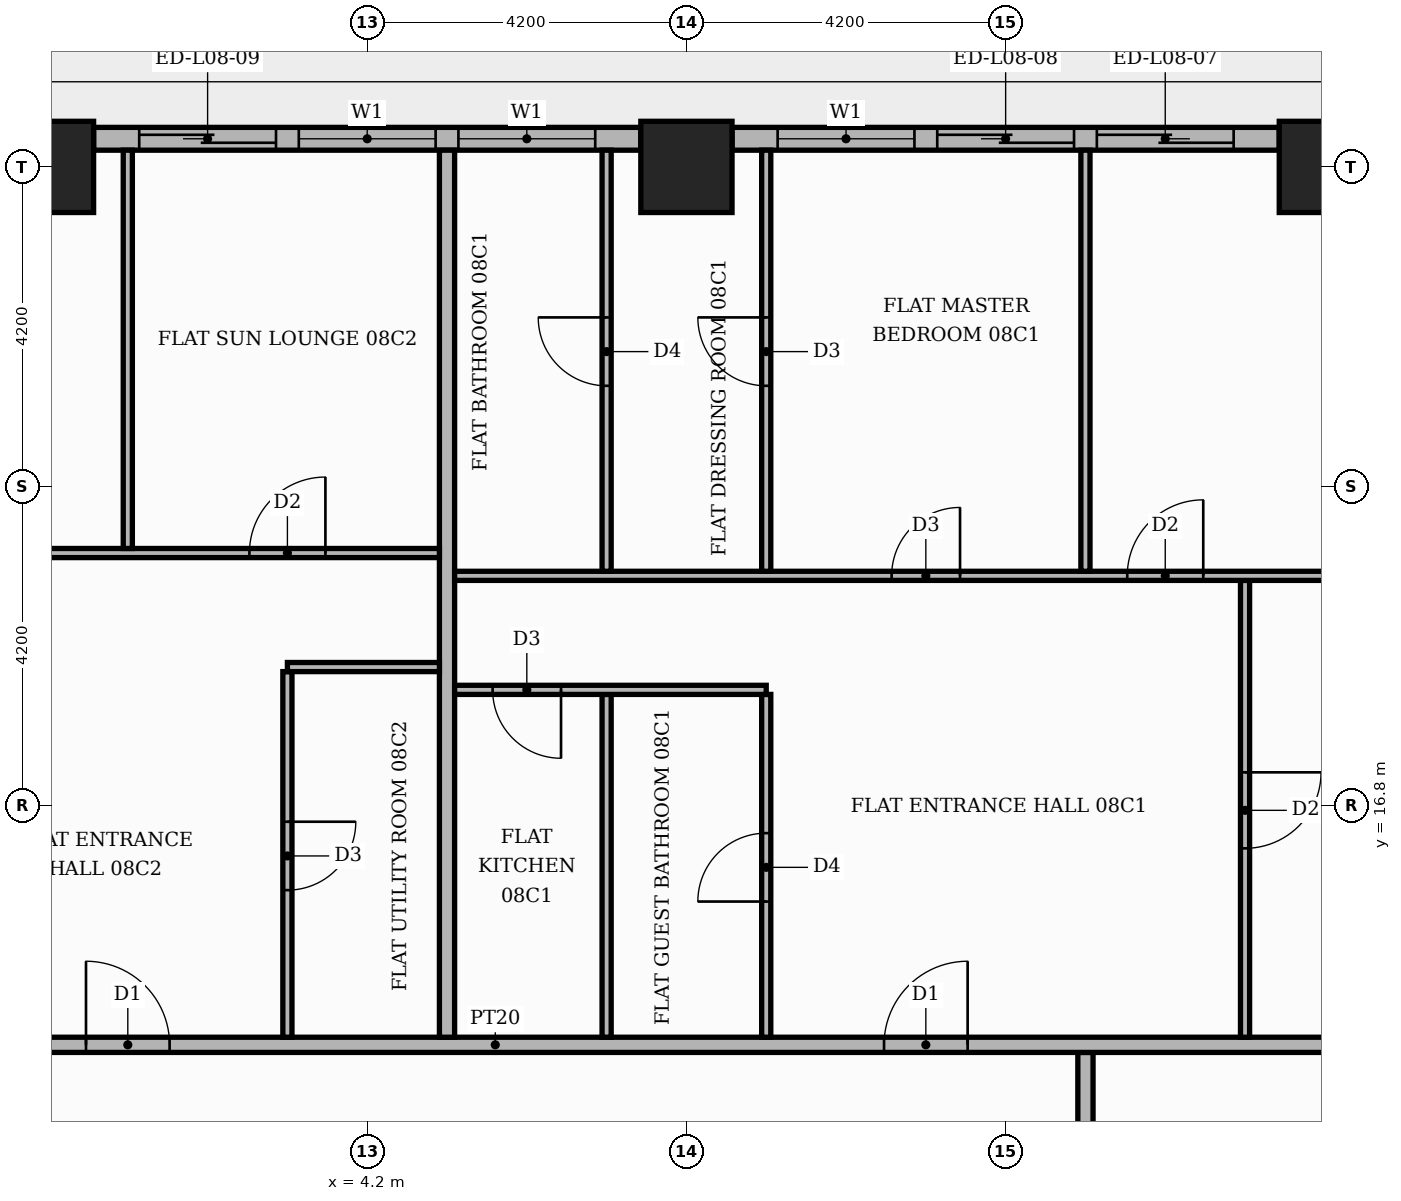
"""IFC4 building model, lengths in metres.
Left out: names, types, materials, properties, quantities, classifications, styles, units other than length and angle.
Written with IfcOpenShell. Run it as: python <this file> out.ifc"""

import sys

from ifc_helpers import new_model, si_unit, direction, frame, frame_2d, origin, origin_2d, place, context, subcontext, project, spatial, rectangle, extrude, element, fill, save


model = new_model("IFC4")
c1 = context("Model", 3, precision=1e-05, world=origin(), true_north=direction((0.0, 1.0)))
c2 = subcontext(c1, "Body", "Model", "MODEL_VIEW")
j1 = project(units=[si_unit("LENGTHUNIT", "METRE"), si_unit("PLANEANGLEUNIT", "RADIAN")], contexts=[c1])
p1 = place(None, origin())
s1 = spatial("IfcSite", under=j1, at=p1, CompositionType="ELEMENT")
p2 = place(p1, origin())
s2 = spatial("IfcBuilding", under=s1, at=p2, CompositionType="ELEMENT")
p3 = place(p2, frame((0.0, 0.0, 38.7)))
s3 = spatial("IfcBuildingStorey", under=s2, at=p3, CompositionType="ELEMENT", Elevation=38.7)
for number, where, z_axis, x_axis in (
    (1, (0.0, 25.2, 0.0), (0.0, 0.0, 1.0), (1.0, 0.0, 0.0)),
    (2, (8.4, 25.2, 0.0), (0.0, 0.0, 1.0), (1.0, 0.0, 0.0)),
    (3, (16.8, 25.2, 0.0), (0.0, 0.0, 1.0), (1.0, 0.0, 0.0)),
):
    element("IfcColumn", number, at=place(p3, frame(where, z_axis=z_axis, x_axis=x_axis)), inside=s3, PredefinedType="COLUMN", context=c2, shape_type="SweptSolid", body=[
        extrude(rectangle(XDim=1.2, YDim=1.2, at=origin_2d()), origin(), (0.0, 0.0, 1.0), 3.9),
    ])
p4 = place(p3, frame((16.2, 25.57, 0.0), z_axis=(0.0, 0.0, 1.0), x_axis=(-1.0, 0.0, 0.0)))
e4 = element("IfcWall", 4, at=p4, inside=s3, PredefinedType="STANDARD", context=c2, shape_type="SweptSolid", body=[
    extrude(rectangle(XDim=7.2, YDim=0.3, at=frame_2d((3.6, 0.0))), origin(), (0.0, 0.0, 1.0), 3.48),
])
p5 = place(p4, frame((0.6, 0.0, 0.0)))
e5 = element("IfcOpeningElement", 5, at=p5, cuts=e4, PredefinedType="OPENING", context=c2, shape_type="SweptSolid", body=[
    extrude(rectangle(XDim=1.8, YDim=2.4, at=frame_2d((0.9, 1.2))), frame((0.0, 0.16, 0.0), z_axis=(0.0, -1.0, 0.0), x_axis=(1.0, 0.0, 0.0)), (0.0, 0.0, 1.0), 0.32),
])
p6 = place(p4, frame((2.7, 0.0, 0.0)))
e6 = element("IfcOpeningElement", 6, at=p6, cuts=e4, PredefinedType="OPENING", context=c2, shape_type="SweptSolid", body=[
    extrude(rectangle(XDim=1.8, YDim=2.4, at=frame_2d((0.9, 1.2))), frame((0.0, 0.16, 0.0), z_axis=(0.0, -1.0, 0.0), x_axis=(1.0, 0.0, 0.0)), (0.0, 0.0, 1.0), 0.32),
])
p7 = place(p4, frame((4.8, 0.0, 0.9)))
e7 = element("IfcOpeningElement", 7, at=p7, cuts=e4, PredefinedType="OPENING", context=c2, shape_type="SweptSolid", body=[
    extrude(rectangle(XDim=1.8, YDim=2.1, at=frame_2d((0.9, 1.05))), frame((0.0, 0.16, 0.0), z_axis=(0.0, -1.0, 0.0), x_axis=(1.0, 0.0, 0.0)), (0.0, 0.0, 1.0), 0.32),
])
p8 = place(p3, frame((7.8, 25.57, 0.0), z_axis=(0.0, 0.0, 1.0), x_axis=(-1.0, 0.0, 0.0)))
e8 = element("IfcWall", 8, at=p8, inside=s3, PredefinedType="STANDARD", context=c2, shape_type="SweptSolid", body=[
    extrude(rectangle(XDim=7.2, YDim=0.3, at=frame_2d((3.6, 0.0))), origin(), (0.0, 0.0, 1.0), 3.48),
])
p9 = place(p8, frame((0.6, 0.0, 0.9)))
e9 = element("IfcOpeningElement", 9, at=p9, cuts=e8, PredefinedType="OPENING", context=c2, shape_type="SweptSolid", body=[
    extrude(rectangle(XDim=1.8, YDim=2.1, at=frame_2d((0.9, 1.05))), frame((0.0, 0.16, 0.0), z_axis=(0.0, -1.0, 0.0), x_axis=(1.0, 0.0, 0.0)), (0.0, 0.0, 1.0), 0.32),
])
p10 = place(p8, frame((2.7, 0.0, 0.9)))
e10 = element("IfcOpeningElement", 10, at=p10, cuts=e8, PredefinedType="OPENING", context=c2, shape_type="SweptSolid", body=[
    extrude(rectangle(XDim=1.8, YDim=2.1, at=frame_2d((0.9, 1.05))), frame((0.0, 0.16, 0.0), z_axis=(0.0, -1.0, 0.0), x_axis=(1.0, 0.0, 0.0)), (0.0, 0.0, 1.0), 0.32),
])
p11 = place(p8, frame((4.8, 0.0, 0.0)))
e11 = element("IfcOpeningElement", 11, at=p11, cuts=e8, PredefinedType="OPENING", context=c2, shape_type="SweptSolid", body=[
    extrude(rectangle(XDim=1.8, YDim=2.4, at=frame_2d((0.9, 1.2))), frame((0.0, 0.16, 0.0), z_axis=(0.0, -1.0, 0.0), x_axis=(1.0, 0.0, 0.0)), (0.0, 0.0, 1.0), 0.32),
])
p12 = place(p3, frame((13.65, -13.55, 0.0), z_axis=(0.0, 0.0, 1.0), x_axis=(0.0, 1.0, 0.0)))
e12 = element("IfcWall", 12, at=p12, inside=s3, PredefinedType="PARTITIONING", context=c2, shape_type="SweptSolid", body=[
    extrude(rectangle(XDim=27.1, YDim=0.2, at=frame_2d((13.55, 0.0))), origin(), (0.0, 0.0, 1.0), 3.48),
])
p13 = place(p12, frame((2.5, 0.0, 0.0)))
e13 = element("IfcOpeningElement", 13, at=p13, cuts=e12, PredefinedType="OPENING", context=c2, shape_type="SweptSolid", body=[
    extrude(rectangle(XDim=1.1, YDim=2.4, at=frame_2d((0.55, 1.2))), frame((0.0, 0.11, 0.0), z_axis=(0.0, -1.0, 0.0), x_axis=(1.0, 0.0, 0.0)), (0.0, 0.0, 1.0), 0.22),
])
p14 = place(p3, frame((-13.65, 13.65, 0.0), z_axis=(0.0, 0.0, 1.0), x_axis=(1.0, 0.0, 0.0)))
e14 = element("IfcWall", 14, at=p14, inside=s3, PredefinedType="PARTITIONING", context=c2, shape_type="SweptSolid", body=[
    extrude(rectangle(XDim=39.07, YDim=0.2, at=frame_2d((19.535, 0.0))), origin(), (0.0, 0.0, 1.0), 3.48),
])
p15 = place(p14, frame((24.65, 0.0, 0.0)))
e15 = element("IfcOpeningElement", 15, at=p15, cuts=e14, PredefinedType="OPENING", context=c2, shape_type="SweptSolid", body=[
    extrude(rectangle(XDim=1.1, YDim=2.4, at=frame_2d((0.55, 1.2))), frame((0.0, 0.11, 0.0), z_axis=(0.0, -1.0, 0.0), x_axis=(1.0, 0.0, 0.0)), (0.0, 0.0, 1.0), 0.22),
])
p16 = place(p14, frame((14.15, 0.0, 0.0)))
e16 = element("IfcOpeningElement", 16, at=p16, cuts=e14, PredefinedType="OPENING", context=c2, shape_type="SweptSolid", body=[
    extrude(rectangle(XDim=1.1, YDim=2.4, at=frame_2d((0.55, 1.2))), frame((0.0, 0.11, 0.0), z_axis=(0.0, -1.0, 0.0), x_axis=(1.0, 0.0, 0.0)), (0.0, 0.0, 1.0), 0.22),
])
p17 = place(p3, frame((3.15, 13.75, 0.0), z_axis=(0.0, 0.0, 1.0), x_axis=(0.0, 1.0, 0.0)))
e17 = element("IfcWall", 17, at=p17, inside=s3, PredefinedType="PARTITIONING", context=c2, shape_type="SweptSolid", body=[
    extrude(rectangle(XDim=4.81, YDim=0.12, at=frame_2d((2.405, 0.0))), origin(), (0.0, 0.0, 1.0), 3.48),
])
p18 = place(p17, frame((1.935, 0.0, 0.0)))
e18 = element("IfcOpeningElement", 18, at=p18, cuts=e17, PredefinedType="OPENING", context=c2, shape_type="SweptSolid", body=[
    extrude(rectangle(XDim=0.9, YDim=2.1, at=frame_2d((0.45, 1.05))), frame((0.0, 0.07, 0.0), z_axis=(0.0, -1.0, 0.0), x_axis=(1.0, 0.0, 0.0)), (0.0, 0.0, 1.0), 0.14),
])
p19 = place(p3, frame((5.25, 13.75, 0.0), z_axis=(0.0, 0.0, 1.0), x_axis=(0.0, 1.0, 0.0)))
e19 = element("IfcWall", 19, at=p19, inside=s3, PredefinedType="PARTITIONING", context=c2, shape_type="SweptSolid", body=[
    extrude(rectangle(XDim=11.67, YDim=0.2, at=frame_2d((5.835, 0.0))), origin(), (0.0, 0.0, 1.0), 3.48),
])
p20 = place(p3, frame((7.35, 13.75, 0.0), z_axis=(0.0, 0.0, 1.0), x_axis=(0.0, 1.0, 0.0)))
e20 = element("IfcWall", 20, at=p20, inside=s3, PredefinedType="PARTITIONING", context=c2, shape_type="SweptSolid", body=[
    extrude(rectangle(XDim=4.51, YDim=0.12, at=frame_2d((2.255, 0.0))), origin(), (0.0, 0.0, 1.0), 3.48),
])
p21 = place(p3, frame((9.45, 13.75, 0.0), z_axis=(0.0, 0.0, 1.0), x_axis=(0.0, 1.0, 0.0)))
e21 = element("IfcWall", 21, at=p21, inside=s3, PredefinedType="PARTITIONING", context=c2, shape_type="SweptSolid", body=[
    extrude(rectangle(XDim=4.51, YDim=0.12, at=frame_2d((2.255, 0.0))), origin(), (0.0, 0.0, 1.0), 3.48),
])
p22 = place(p21, frame((1.785, 0.0, 0.0)))
e22 = element("IfcOpeningElement", 22, at=p22, cuts=e21, PredefinedType="OPENING", context=c2, shape_type="SweptSolid", body=[
    extrude(rectangle(XDim=0.9, YDim=2.1, at=frame_2d((0.45, 1.05))), frame((0.0, 0.07, 0.0), z_axis=(0.0, -1.0, 0.0), x_axis=(1.0, 0.0, 0.0)), (0.0, 0.0, 1.0), 0.14),
])
p23 = place(p3, frame((15.75, 13.75, 0.0), z_axis=(0.0, 0.0, 1.0), x_axis=(0.0, 1.0, 0.0)))
e23 = element("IfcWall", 23, at=p23, inside=s3, PredefinedType="PARTITIONING", context=c2, shape_type="SweptSolid", body=[
    extrude(rectangle(XDim=6.01, YDim=0.12, at=frame_2d((3.005, 0.0))), origin(), (0.0, 0.0, 1.0), 3.48),
])
p24 = place(p23, frame((2.485, 0.0, 0.0)))
e24 = element("IfcOpeningElement", 24, at=p24, cuts=e23, PredefinedType="OPENING", context=c2, shape_type="SweptSolid", body=[
    extrude(rectangle(XDim=1.0, YDim=2.1, at=frame_2d((0.5, 1.05))), frame((0.0, 0.07, 0.0), z_axis=(0.0, -1.0, 0.0), x_axis=(1.0, 0.0, 0.0)), (0.0, 0.0, 1.0), 0.14),
])
p25 = place(p3, frame((5.35, 18.32, 0.0), z_axis=(0.0, 0.0, 1.0), x_axis=(1.0, 0.0, 0.0)))
e25 = element("IfcWall", 25, at=p25, inside=s3, PredefinedType="PARTITIONING", context=c2, shape_type="SweptSolid", body=[
    extrude(rectangle(XDim=4.1, YDim=0.12, at=frame_2d((2.05, 0.0))), origin(), (0.0, 0.0, 1.0), 3.48),
])
p26 = place(p25, frame((0.5, 0.0, 0.0)))
e26 = element("IfcOpeningElement", 26, at=p26, cuts=e25, PredefinedType="OPENING", context=c2, shape_type="SweptSolid", body=[
    extrude(rectangle(XDim=0.9, YDim=2.1, at=frame_2d((0.45, 1.05))), frame((0.0, 0.07, 0.0), z_axis=(0.0, -1.0, 0.0), x_axis=(1.0, 0.0, 0.0)), (0.0, 0.0, 1.0), 0.14),
])
p27 = place(p3, frame((3.15, 18.62, 0.0), z_axis=(0.0, 0.0, 1.0), x_axis=(1.0, 0.0, 0.0)))
e27 = element("IfcWall", 27, at=p27, inside=s3, PredefinedType="PARTITIONING", context=c2, shape_type="SweptSolid", body=[
    extrude(rectangle(XDim=2.0, YDim=0.12, at=frame_2d((1.0, 0.0))), origin(), (0.0, 0.0, 1.0), 3.48),
])
p28 = place(p3, frame((5.35, 19.82, 0.0), z_axis=(0.0, 0.0, 1.0), x_axis=(1.0, 0.0, 0.0)))
e28 = element("IfcWall", 28, at=p28, inside=s3, PredefinedType="PARTITIONING", context=c2, shape_type="SweptSolid", body=[
    extrude(rectangle(XDim=11.95, YDim=0.12, at=frame_2d((5.975, 0.0))), origin(), (0.0, 0.0, 1.0), 3.48),
])
p29 = place(p28, frame((8.85, 0.0, 0.0)))
e29 = element("IfcOpeningElement", 29, at=p29, cuts=e28, PredefinedType="OPENING", context=c2, shape_type="SweptSolid", body=[
    extrude(rectangle(XDim=1.0, YDim=2.1, at=frame_2d((0.5, 1.05))), frame((0.0, 0.07, 0.0), z_axis=(0.0, -1.0, 0.0), x_axis=(1.0, 0.0, 0.0)), (0.0, 0.0, 1.0), 0.14),
])
p30 = place(p28, frame((5.75, 0.0, 0.0)))
e30 = element("IfcOpeningElement", 30, at=p30, cuts=e28, PredefinedType="OPENING", context=c2, shape_type="SweptSolid", body=[
    extrude(rectangle(XDim=0.9, YDim=2.1, at=frame_2d((0.45, 1.05))), frame((0.0, 0.07, 0.0), z_axis=(0.0, -1.0, 0.0), x_axis=(1.0, 0.0, 0.0)), (0.0, 0.0, 1.0), 0.14),
])
p31 = place(p3, frame((7.35, 19.88, 0.0), z_axis=(0.0, 0.0, 1.0), x_axis=(0.0, 1.0, 0.0)))
e31 = element("IfcWall", 31, at=p31, inside=s3, PredefinedType="PARTITIONING", context=c2, shape_type="SweptSolid", body=[
    extrude(rectangle(XDim=5.54, YDim=0.12, at=frame_2d((2.77, 0.0))), origin(), (0.0, 0.0, 1.0), 3.48),
])
p32 = place(p31, frame((2.44, 0.0, 0.0)))
e32 = element("IfcOpeningElement", 32, at=p32, cuts=e31, PredefinedType="OPENING", context=c2, shape_type="SweptSolid", body=[
    extrude(rectangle(XDim=0.9, YDim=2.1, at=frame_2d((0.45, 1.05))), frame((0.0, 0.07, 0.0), z_axis=(0.0, -1.0, 0.0), x_axis=(1.0, 0.0, 0.0)), (0.0, 0.0, 1.0), 0.14),
])
p33 = place(p3, frame((9.45, 19.88, 0.0), z_axis=(0.0, 0.0, 1.0), x_axis=(0.0, 1.0, 0.0)))
e33 = element("IfcWall", 33, at=p33, inside=s3, PredefinedType="PARTITIONING", context=c2, shape_type="SweptSolid", body=[
    extrude(rectangle(XDim=5.54, YDim=0.12, at=frame_2d((2.77, 0.0))), origin(), (0.0, 0.0, 1.0), 3.48),
])
p34 = place(p33, frame((2.44, 0.0, 0.0)))
e34 = element("IfcOpeningElement", 34, at=p34, cuts=e33, PredefinedType="OPENING", context=c2, shape_type="SweptSolid", body=[
    extrude(rectangle(XDim=0.9, YDim=2.1, at=frame_2d((0.45, 1.05))), frame((0.0, 0.07, 0.0), z_axis=(0.0, -1.0, 0.0), x_axis=(1.0, 0.0, 0.0)), (0.0, 0.0, 1.0), 0.14),
])
p35 = place(p3, frame((13.65, 19.88, 0.0), z_axis=(0.0, 0.0, 1.0), x_axis=(0.0, 1.0, 0.0)))
e35 = element("IfcWall", 35, at=p35, inside=s3, PredefinedType="PARTITIONING", context=c2, shape_type="SweptSolid", body=[
    extrude(rectangle(XDim=5.54, YDim=0.12, at=frame_2d((2.77, 0.0))), origin(), (0.0, 0.0, 1.0), 3.48),
])
p36 = place(p3, frame((-13.55, 20.12, 0.0), z_axis=(0.0, 0.0, 1.0), x_axis=(1.0, 0.0, 0.0)))
e36 = element("IfcWall", 36, at=p36, inside=s3, PredefinedType="PARTITIONING", context=c2, shape_type="SweptSolid", body=[
    extrude(rectangle(XDim=18.7, YDim=0.12, at=frame_2d((9.35, 0.0))), origin(), (0.0, 0.0, 1.0), 3.48),
])
p37 = place(p36, frame((16.2, 0.0, 0.0)))
e37 = element("IfcOpeningElement", 37, at=p37, cuts=e36, PredefinedType="OPENING", context=c2, shape_type="SweptSolid", body=[
    extrude(rectangle(XDim=1.0, YDim=2.1, at=frame_2d((0.5, 1.05))), frame((0.0, 0.07, 0.0), z_axis=(0.0, -1.0, 0.0), x_axis=(1.0, 0.0, 0.0)), (0.0, 0.0, 1.0), 0.14),
])
p38 = place(p36, frame((12.05, 0.0, 0.0)))
e38 = element("IfcOpeningElement", 38, at=p38, cuts=e36, PredefinedType="OPENING", context=c2, shape_type="SweptSolid", body=[
    extrude(rectangle(XDim=0.9, YDim=2.1, at=frame_2d((0.45, 1.05))), frame((0.0, 0.07, 0.0), z_axis=(0.0, -1.0, 0.0), x_axis=(1.0, 0.0, 0.0)), (0.0, 0.0, 1.0), 0.14),
])
p39 = place(p36, frame((3.65, 0.0, 0.0)))
e39 = element("IfcOpeningElement", 39, at=p39, cuts=e36, PredefinedType="OPENING", context=c2, shape_type="SweptSolid", body=[
    extrude(rectangle(XDim=0.9, YDim=2.1, at=frame_2d((0.45, 1.05))), frame((0.0, 0.07, 0.0), z_axis=(0.0, -1.0, 0.0), x_axis=(1.0, 0.0, 0.0)), (0.0, 0.0, 1.0), 0.14),
])
p40 = place(p3, frame((1.05, 20.18, 0.0), z_axis=(0.0, 0.0, 1.0), x_axis=(0.0, 1.0, 0.0)))
e40 = element("IfcWall", 40, at=p40, inside=s3, PredefinedType="PARTITIONING", context=c2, shape_type="SweptSolid", body=[
    extrude(rectangle(XDim=5.24, YDim=0.12, at=frame_2d((2.62, 0.0))), origin(), (0.0, 0.0, 1.0), 3.48),
])
p41 = place(p5, origin())
e41 = element("IfcDoor", 41, at=p41, inside=s3, OperationType="SLIDING_TO_LEFT", PredefinedType="DOOR", context=c2, shape_type="SweptSolid", body=[
    extrude(rectangle(XDim=1.8, YDim=2.4, at=frame_2d((0.9, 1.2))), frame((0.0, 0.025, 0.0), z_axis=(0.0, -1.0, 0.0), x_axis=(1.0, 0.0, 0.0)), (0.0, 0.0, 1.0), 0.05),
])
fill(e5, e41)
p42 = place(p6, origin())
e42 = element("IfcDoor", 42, at=p42, inside=s3, OperationType="SLIDING_TO_RIGHT", PredefinedType="DOOR", context=c2, shape_type="SweptSolid", body=[
    extrude(rectangle(XDim=1.8, YDim=2.4, at=frame_2d((0.9, 1.2))), frame((0.0, 0.025, 0.0), z_axis=(0.0, -1.0, 0.0), x_axis=(1.0, 0.0, 0.0)), (0.0, 0.0, 1.0), 0.05),
])
fill(e6, e42)
p43 = place(p7, origin())
e43 = element("IfcWindow", 43, at=p43, inside=s3, PartitioningType="SINGLE_PANEL", PredefinedType="WINDOW", context=c2, shape_type="SweptSolid", body=[
    extrude(rectangle(XDim=1.8, YDim=2.1, at=frame_2d((0.9, 1.05))), frame((0.0, 0.03, 0.0), z_axis=(0.0, -1.0, 0.0), x_axis=(1.0, 0.0, 0.0)), (0.0, 0.0, 1.0), 0.06),
])
fill(e7, e43)
p44 = place(p9, origin())
e44 = element("IfcWindow", 44, at=p44, inside=s3, PartitioningType="SINGLE_PANEL", PredefinedType="WINDOW", context=c2, shape_type="SweptSolid", body=[
    extrude(rectangle(XDim=1.8, YDim=2.1, at=frame_2d((0.9, 1.05))), frame((0.0, 0.03, 0.0), z_axis=(0.0, -1.0, 0.0), x_axis=(1.0, 0.0, 0.0)), (0.0, 0.0, 1.0), 0.06),
])
fill(e9, e44)
p45 = place(p10, origin())
e45 = element("IfcWindow", 45, at=p45, inside=s3, PartitioningType="SINGLE_PANEL", PredefinedType="WINDOW", context=c2, shape_type="SweptSolid", body=[
    extrude(rectangle(XDim=1.8, YDim=2.1, at=frame_2d((0.9, 1.05))), frame((0.0, 0.03, 0.0), z_axis=(0.0, -1.0, 0.0), x_axis=(1.0, 0.0, 0.0)), (0.0, 0.0, 1.0), 0.06),
])
fill(e10, e45)
p46 = place(p11, origin())
e46 = element("IfcDoor", 46, at=p46, inside=s3, OperationType="SLIDING_TO_RIGHT", PredefinedType="DOOR", context=c2, shape_type="SweptSolid", body=[
    extrude(rectangle(XDim=1.8, YDim=2.4, at=frame_2d((0.9, 1.2))), frame((0.0, 0.025, 0.0), z_axis=(0.0, -1.0, 0.0), x_axis=(1.0, 0.0, 0.0)), (0.0, 0.0, 1.0), 0.05),
])
fill(e11, e46)
p47 = place(p15, origin())
e47 = element("IfcDoor", 47, at=p47, inside=s3, OperationType="SINGLE_SWING_RIGHT", PredefinedType="DOOR", context=c2, shape_type="SweptSolid", body=[
    extrude(rectangle(XDim=1.1, YDim=2.4, at=frame_2d((0.55, 1.2))), frame((0.0, 0.025, 0.0), z_axis=(0.0, -1.0, 0.0), x_axis=(1.0, 0.0, 0.0)), (0.0, 0.0, 1.0), 0.05),
])
fill(e15, e47)
p48 = place(p24, frame((1.0, 0.0, 0.0), z_axis=(0.0, 0.0, 1.0), x_axis=(-1.0, 0.0, 0.0)))
e48 = element("IfcDoor", 48, at=p48, inside=s3, OperationType="SINGLE_SWING_RIGHT", PredefinedType="DOOR", context=c2, shape_type="SweptSolid", body=[
    extrude(rectangle(XDim=1.0, YDim=2.1, at=frame_2d((0.5, 1.05))), frame((0.0, 0.025, 0.0), z_axis=(0.0, -1.0, 0.0), x_axis=(1.0, 0.0, 0.0)), (0.0, 0.0, 1.0), 0.05),
])
fill(e24, e48)
p49 = place(p22, origin())
e49 = element("IfcDoor", 49, at=p49, inside=s3, OperationType="SINGLE_SWING_LEFT", PredefinedType="DOOR", context=c2, shape_type="SweptSolid", body=[
    extrude(rectangle(XDim=0.9, YDim=2.1, at=frame_2d((0.45, 1.05))), frame((0.0, 0.025, 0.0), z_axis=(0.0, -1.0, 0.0), x_axis=(1.0, 0.0, 0.0)), (0.0, 0.0, 1.0), 0.05),
])
fill(e22, e49)
p50 = place(p26, frame((0.9, 0.0, 0.0), z_axis=(0.0, 0.0, 1.0), x_axis=(-1.0, 0.0, 0.0)))
e50 = element("IfcDoor", 50, at=p50, inside=s3, OperationType="SINGLE_SWING_RIGHT", PredefinedType="DOOR", context=c2, shape_type="SweptSolid", body=[
    extrude(rectangle(XDim=0.9, YDim=2.1, at=frame_2d((0.45, 1.05))), frame((0.0, 0.025, 0.0), z_axis=(0.0, -1.0, 0.0), x_axis=(1.0, 0.0, 0.0)), (0.0, 0.0, 1.0), 0.05),
])
fill(e26, e50)
p51 = place(p29, origin())
e51 = element("IfcDoor", 51, at=p51, inside=s3, OperationType="SINGLE_SWING_RIGHT", PredefinedType="DOOR", context=c2, shape_type="SweptSolid", body=[
    extrude(rectangle(XDim=1.0, YDim=2.1, at=frame_2d((0.5, 1.05))), frame((0.0, 0.025, 0.0), z_axis=(0.0, -1.0, 0.0), x_axis=(1.0, 0.0, 0.0)), (0.0, 0.0, 1.0), 0.05),
])
fill(e29, e51)
p52 = place(p30, origin())
e52 = element("IfcDoor", 52, at=p52, inside=s3, OperationType="SINGLE_SWING_RIGHT", PredefinedType="DOOR", context=c2, shape_type="SweptSolid", body=[
    extrude(rectangle(XDim=0.9, YDim=2.1, at=frame_2d((0.45, 1.05))), frame((0.0, 0.025, 0.0), z_axis=(0.0, -1.0, 0.0), x_axis=(1.0, 0.0, 0.0)), (0.0, 0.0, 1.0), 0.05),
])
fill(e30, e52)
p53 = place(p34, origin())
e53 = element("IfcDoor", 53, at=p53, inside=s3, OperationType="SINGLE_SWING_RIGHT", PredefinedType="DOOR", context=c2, shape_type="SweptSolid", body=[
    extrude(rectangle(XDim=0.9, YDim=2.1, at=frame_2d((0.45, 1.05))), frame((0.0, 0.025, 0.0), z_axis=(0.0, -1.0, 0.0), x_axis=(1.0, 0.0, 0.0)), (0.0, 0.0, 1.0), 0.05),
])
fill(e34, e53)
p54 = place(p32, origin())
e54 = element("IfcDoor", 54, at=p54, inside=s3, OperationType="SINGLE_SWING_RIGHT", PredefinedType="DOOR", context=c2, shape_type="SweptSolid", body=[
    extrude(rectangle(XDim=0.9, YDim=2.1, at=frame_2d((0.45, 1.05))), frame((0.0, 0.025, 0.0), z_axis=(0.0, -1.0, 0.0), x_axis=(1.0, 0.0, 0.0)), (0.0, 0.0, 1.0), 0.05),
])
fill(e32, e54)
p55 = place(p16, origin())
e55 = element("IfcDoor", 55, at=p55, inside=s3, OperationType="SINGLE_SWING_LEFT", PredefinedType="DOOR", context=c2, shape_type="SweptSolid", body=[
    extrude(rectangle(XDim=1.1, YDim=2.4, at=frame_2d((0.55, 1.2))), frame((0.0, 0.025, 0.0), z_axis=(0.0, -1.0, 0.0), x_axis=(1.0, 0.0, 0.0)), (0.0, 0.0, 1.0), 0.05),
])
fill(e16, e55)
p56 = place(p18, frame((0.9, 0.0, 0.0), z_axis=(0.0, 0.0, 1.0), x_axis=(-1.0, 0.0, 0.0)))
e56 = element("IfcDoor", 56, at=p56, inside=s3, OperationType="SINGLE_SWING_RIGHT", PredefinedType="DOOR", context=c2, shape_type="SweptSolid", body=[
    extrude(rectangle(XDim=0.9, YDim=2.1, at=frame_2d((0.45, 1.05))), frame((0.0, 0.025, 0.0), z_axis=(0.0, -1.0, 0.0), x_axis=(1.0, 0.0, 0.0)), (0.0, 0.0, 1.0), 0.05),
])
fill(e18, e56)
p57 = place(p37, origin())
e57 = element("IfcDoor", 57, at=p57, inside=s3, OperationType="SINGLE_SWING_RIGHT", PredefinedType="DOOR", context=c2, shape_type="SweptSolid", body=[
    extrude(rectangle(XDim=1.0, YDim=2.1, at=frame_2d((0.5, 1.05))), frame((0.0, 0.025, 0.0), z_axis=(0.0, -1.0, 0.0), x_axis=(1.0, 0.0, 0.0)), (0.0, 0.0, 1.0), 0.05),
])
fill(e37, e57)
save(model, sys.argv[1])
